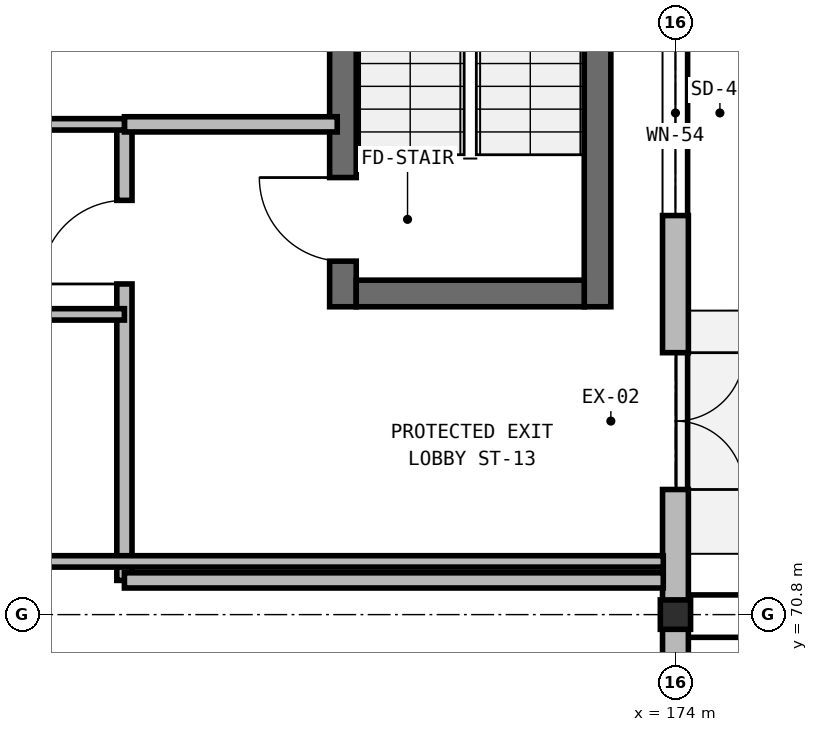
"""IFC4 building model, lengths in metres.
Left out: names, types, materials, properties, quantities, classifications, styles, units other than length and angle.
Written with IfcOpenShell. Run it as: python <this file> out.ifc"""

import sys

from ifc_helpers import new_model, si_unit, direction, frame, frame_2d, origin, origin_2d, place, context, subcontext, project, spatial, rectangle, i_section, extrude, element, fill, save


model = new_model("IFC4")
c1 = context("Model", 3, precision=1e-05, world=origin(), true_north=direction((0.0, 1.0)))
c2 = subcontext(c1, "Body", "Model", "MODEL_VIEW")
j1 = project(units=[si_unit("LENGTHUNIT", "METRE"), si_unit("PLANEANGLEUNIT", "RADIAN")], contexts=[c1])
p1 = place(None, origin())
s1 = spatial("IfcSite", under=j1, at=p1, CompositionType="ELEMENT")
p2 = place(p1, origin())
s2 = spatial("IfcBuilding", under=s1, at=p2, CompositionType="ELEMENT")
p3 = place(p2, origin())
s3 = spatial("IfcBuildingStorey", under=s2, at=p3, CompositionType="ELEMENT", Elevation=0.0)
p4 = place(p3, frame((169.625, 74.85, 0.0), z_axis=(0.0, 0.0, 1.0), x_axis=(0.0, 1.0, 0.0)))
e1 = element("IfcWall", 1, at=p4, inside=s3, PredefinedType="SHEAR", context=c2, shape_type="SweptSolid", body=[
    extrude(rectangle(XDim=8.2, YDim=0.35, at=frame_2d((4.1, 0.0))), origin(), (0.0, 0.0, 1.0), 5.25),
])
p5 = place(p4, frame((0.6, 0.0, 0.0)))
e2 = element("IfcOpeningElement", 2, at=p5, cuts=e1, PredefinedType="OPENING", context=c2, shape_type="SweptSolid", body=[
    extrude(rectangle(XDim=1.1, YDim=2.15, at=frame_2d((0.55, 1.075))), frame((0.0, 0.185, 0.0), z_axis=(0.0, -1.0, 0.0), x_axis=(1.0, 0.0, 0.0)), (0.0, 0.0, 1.0), 0.37),
])
p6 = place(p3, frame((172.975, 83.05, 0.0), z_axis=(0.0, 0.0, 1.0), x_axis=(0.0, -1.0, 0.0)))
e3 = element("IfcWall", 3, at=p6, inside=s3, PredefinedType="SHEAR", context=c2, shape_type="SweptSolid", body=[
    extrude(rectangle(XDim=8.2, YDim=0.35, at=frame_2d((4.1, 0.0))), origin(), (0.0, 0.0, 1.0), 5.25),
])
p7 = place(p3, frame((172.8, 75.025, 0.0), z_axis=(0.0, 0.0, 1.0), x_axis=(-1.0, 0.0, 0.0)))
e4 = element("IfcWall", 4, at=p7, inside=s3, PredefinedType="SHEAR", context=c2, shape_type="SweptSolid", body=[
    extrude(rectangle(XDim=3.0, YDim=0.35, at=frame_2d((1.5, 0.0))), origin(), (0.0, 0.0, 1.0), 5.25),
])
p8 = place(p3, frame((174.0, 70.8, 0.0), z_axis=(0.0, 0.0, 1.0), x_axis=(1.0, 0.0, 0.0)))
e5 = element("IfcColumn", 5, at=p8, inside=s3, PredefinedType="COLUMN", context=c2, shape_type="SweptSolid", body=[
    extrude(i_section(OverallWidth=0.398, OverallDepth=0.387, WebThickness=0.024, FlangeThickness=0.039, at=origin_2d()), origin(), (0.0, 0.0, 1.0), 5.25),
])
p9 = place(p3, frame((174.0, 83.996, 0.0), z_axis=(0.0, 0.0, 1.0), x_axis=(0.0, -1.0, 0.0)))
e6 = element("IfcWall", 6, at=p9, inside=s3, PredefinedType="SOLIDWALL", context=c2, shape_type="SweptSolid", body=[
    extrude(rectangle(XDim=13.192, YDim=0.34, at=frame_2d((6.596, 0.0))), origin(), (0.0, 0.0, 1.0), 4.516),
])
p10 = place(p9, frame((9.75, 0.0, 0.0)))
e7 = element("IfcOpeningElement", 7, at=p10, cuts=e6, PredefinedType="OPENING", context=c2, shape_type="SweptSolid", body=[
    extrude(rectangle(XDim=1.8, YDim=2.25, at=frame_2d((0.9, 1.125))), frame((0.0, 0.18, 0.0), z_axis=(0.0, -1.0, 0.0), x_axis=(1.0, 0.0, 0.0)), (0.0, 0.0, 1.0), 0.36),
])
p11 = place(p9, frame((5.246, 0.0, 0.95)))
e8 = element("IfcOpeningElement", 8, at=p11, cuts=e6, PredefinedType="OPENING", context=c2, shape_type="SweptSolid", body=[
    extrude(rectangle(XDim=2.7, YDim=1.97, at=frame_2d((1.35, 0.985))), frame((0.0, 0.18, 0.0), z_axis=(0.0, -1.0, 0.0), x_axis=(1.0, 0.0, 0.0)), (0.0, 0.0, 1.0), 0.36),
])
p12 = place(p3, frame((174.0, 70.796, 0.0), z_axis=(0.0, 0.0, 1.0), x_axis=(0.0, -1.0, 0.0)))
e9 = element("IfcWall", 9, at=p12, inside=s3, PredefinedType="SOLIDWALL", context=c2, shape_type="SweptSolid", body=[
    extrude(rectangle(XDim=13.192, YDim=0.34, at=frame_2d((6.596, 0.0))), origin(), (0.0, 0.0, 1.0), 4.516),
])
p13 = place(p12, frame((9.5, 0.0, 0.0)))
e10 = element("IfcOpeningElement", 10, at=p13, cuts=e9, PredefinedType="OPENING", context=c2, shape_type="SweptSolid", body=[
    extrude(rectangle(XDim=1.8, YDim=2.25, at=frame_2d((0.9, 1.125))), frame((0.0, 0.18, 0.0), z_axis=(0.0, -1.0, 0.0), x_axis=(1.0, 0.0, 0.0)), (0.0, 0.0, 1.0), 0.36),
])
p14 = place(p12, frame((5.961, 0.0, 0.95)))
e11 = element("IfcOpeningElement", 11, at=p14, cuts=e9, PredefinedType="OPENING", context=c2, shape_type="SweptSolid", body=[
    extrude(rectangle(XDim=1.27, YDim=1.89, at=frame_2d((0.635, 0.945))), frame((0.0, 0.18, 0.0), z_axis=(0.0, -1.0, 0.0), x_axis=(1.0, 0.0, 0.0)), (0.0, 0.0, 1.0), 0.36),
])
p15 = place(p3, frame((166.75, 71.25, 0.0), z_axis=(0.0, 0.0, 1.0), x_axis=(0.0, 1.0, 0.0)))
e12 = element("IfcWall", 12, at=p15, inside=s3, PredefinedType="SOLIDWALL", context=c2, shape_type="SweptSolid", body=[
    extrude(rectangle(XDim=6.0, YDim=0.2, at=frame_2d((3.0, 0.0))), origin(), (0.0, 0.0, 1.0), 4.93),
])
p16 = place(p15, frame((3.9, 0.0, 0.0)))
e13 = element("IfcOpeningElement", 13, at=p16, cuts=e12, PredefinedType="OPENING", context=c2, shape_type="SweptSolid", body=[
    extrude(rectangle(XDim=1.1, YDim=2.15, at=frame_2d((0.55, 1.075))), frame((0.0, 0.11, 0.0), z_axis=(0.0, -1.0, 0.0), x_axis=(1.0, 0.0, 0.0)), (0.0, 0.0, 1.0), 0.22),
])
p17 = place(p3, frame((166.75, 71.25, 0.0), z_axis=(0.0, 0.0, 1.0), x_axis=(1.0, 0.0, 0.0)))
e14 = element("IfcWall", 14, at=p17, inside=s3, PredefinedType="SOLIDWALL", context=c2, shape_type="SweptSolid", body=[
    extrude(rectangle(XDim=7.09, YDim=0.2, at=frame_2d((3.545, 0.0))), origin(), (0.0, 0.0, 1.0), 4.93),
])
p18 = place(p3, frame((166.75, 77.25, 0.0), z_axis=(0.0, 0.0, 1.0), x_axis=(1.0, 0.0, 0.0)))
e15 = element("IfcWall", 15, at=p18, inside=s3, PredefinedType="SOLIDWALL", context=c2, shape_type="SweptSolid", body=[
    extrude(rectangle(XDim=2.8, YDim=0.2, at=frame_2d((1.4, 0.0))), origin(), (0.0, 0.0, 1.0), 4.93),
])
for number, where, z_axis, x_axis in (
    (16, (162.7, 74.75, 0.0), (0.0, 0.0, 1.0), (1.0, 0.0, 0.0)),
    (17, (162.7, 77.25, 0.0), (0.0, 0.0, 1.0), (1.0, 0.0, 0.0)),
):
    element("IfcWall", number, at=place(p3, frame(where, z_axis=z_axis, x_axis=x_axis)), inside=s3, PredefinedType="PARTITIONING", context=c2, shape_type="SweptSolid", body=[
        extrude(rectangle(XDim=4.05, YDim=0.15, at=frame_2d((2.025, 0.0))), origin(), (0.0, 0.0, 1.0), 4.93),
    ])
p19 = place(p3, frame((162.79, 71.5, 0.0), z_axis=(0.0, 0.0, 1.0), x_axis=(1.0, 0.0, 0.0)))
e18 = element("IfcWall", 18, at=p19, inside=s3, PredefinedType="PARTITIONING", context=c2, shape_type="SweptSolid", body=[
    extrude(rectangle(XDim=11.05, YDim=0.15, at=frame_2d((5.525, 0.0))), origin(), (0.0, 0.0, 1.0), 4.93),
])
p20 = place(p10, origin())
e19 = element("IfcDoor", 19, at=p20, inside=s3, OperationType="DOUBLE_DOOR_SINGLE_SWING", PredefinedType="DOOR", context=c2, shape_type="SweptSolid", body=[
    extrude(rectangle(XDim=1.8, YDim=2.25, at=frame_2d((0.9, 1.125))), frame((0.0, 0.025, 0.0), z_axis=(0.0, -1.0, 0.0), x_axis=(1.0, 0.0, 0.0)), (0.0, 0.0, 1.0), 0.05),
])
fill(e7, e19)
p21 = place(p11, origin())
e20 = element("IfcWindow", 20, at=p21, inside=s3, PartitioningType="SINGLE_PANEL", PredefinedType="WINDOW", context=c2, shape_type="SweptSolid", body=[
    extrude(rectangle(XDim=2.7, YDim=1.97, at=frame_2d((1.35, 0.985))), frame((0.0, 0.03, 0.0), z_axis=(0.0, -1.0, 0.0), x_axis=(1.0, 0.0, 0.0)), (0.0, 0.0, 1.0), 0.06),
])
fill(e8, e20)
p22 = place(p5, origin())
e21 = element("IfcDoor", 21, at=p22, inside=s3, OperationType="SINGLE_SWING_RIGHT", PredefinedType="DOOR", context=c2, shape_type="SweptSolid", body=[
    extrude(rectangle(XDim=1.1, YDim=2.15, at=frame_2d((0.55, 1.075))), frame((0.0, 0.025, 0.0), z_axis=(0.0, -1.0, 0.0), x_axis=(1.0, 0.0, 0.0)), (0.0, 0.0, 1.0), 0.05),
])
fill(e2, e21)
p23 = place(p16, origin())
e22 = element("IfcDoor", 22, at=p23, inside=s3, OperationType="SINGLE_SWING_LEFT", PredefinedType="DOOR", context=c2, shape_type="SweptSolid", body=[
    extrude(rectangle(XDim=1.1, YDim=2.15, at=frame_2d((0.55, 1.075))), frame((0.0, 0.025, 0.0), z_axis=(0.0, -1.0, 0.0), x_axis=(1.0, 0.0, 0.0)), (0.0, 0.0, 1.0), 0.05),
])
fill(e13, e22)
save(model, sys.argv[1])
